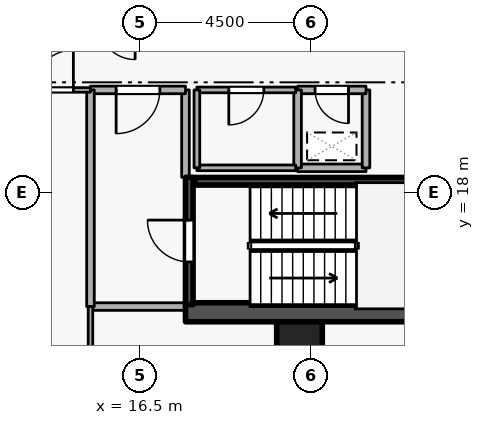
"""IFC4 building model, lengths in metres.
Left out: names, types, materials, properties, quantities, classifications, styles, units other than length and angle.
Written with IfcOpenShell. Run it as: python <this file> out.ifc"""

import sys

from ifc_helpers import new_model, si_unit, direction, frame, frame_2d, origin, origin_2d, place, context, subcontext, project, spatial, rectangle, extrude, element, fill, save


model = new_model("IFC4")
c1 = context("Model", 3, precision=1e-05, world=origin(), true_north=direction((0.0, 1.0)))
c2 = subcontext(c1, "Body", "Model", "MODEL_VIEW")
j1 = project(units=[si_unit("LENGTHUNIT", "METRE"), si_unit("PLANEANGLEUNIT", "RADIAN")], contexts=[c1])
p1 = place(None, origin())
s1 = spatial("IfcSite", under=j1, at=p1, CompositionType="ELEMENT")
p2 = place(p1, origin())
s2 = spatial("IfcBuilding", under=s1, at=p2, CompositionType="ELEMENT")
p3 = place(p2, frame((0.0, 0.0, 137.7)))
s3 = spatial("IfcBuildingStorey", under=s2, at=p3, CompositionType="ELEMENT", Elevation=137.7)
p4 = place(p3, frame((17.7, 14.85, 0.0), z_axis=(0.0, 0.0, 1.0), x_axis=(1.0, 0.0, 0.0)))
e1 = element("IfcWall", 1, at=p4, inside=s3, PredefinedType="SHEAR", context=c2, shape_type="SweptSolid", body=[
    extrude(rectangle(XDim=15.6, YDim=0.5, at=frame_2d((7.8, 0.0))), origin(), (0.0, 0.0, 1.0), 3.6),
])
p5 = place(p3, frame((20.7, 14.0, 0.0), z_axis=(0.0, 0.0, 1.0), x_axis=(1.0, 0.0, 0.0)))
e2 = element("IfcColumn", 2, at=p5, inside=s3, PredefinedType="COLUMN", context=c2, shape_type="SweptSolid", body=[
    extrude(rectangle(XDim=1.2, YDim=1.2, at=origin_2d()), origin(), (0.0, 0.0, 1.0), 3.6),
])
p6 = place(p3, frame((17.8, 15.05, 0.0), z_axis=(0.0, 0.0, 1.0), x_axis=(0.0, 1.0, 0.0)))
e3 = element("IfcWall", 3, at=p6, inside=s3, PredefinedType="SHEAR", context=c2, shape_type="SweptSolid", body=[
    extrude(rectangle(XDim=3.35, YDim=0.2, at=frame_2d((1.675, 0.0))), origin(), (0.0, 0.0, 1.0), 3.6),
])
p7 = place(p6, frame((1.125, 0.0, 0.0)))
e4 = element("IfcOpeningElement", 4, at=p7, cuts=e3, PredefinedType="OPENING", context=c2, shape_type="SweptSolid", body=[
    extrude(rectangle(XDim=1.1, YDim=2.1, at=frame_2d((0.55, 1.05))), frame((0.0, 0.11, 0.0), z_axis=(0.0, -1.0, 0.0), x_axis=(1.0, 0.0, 0.0)), (0.0, 0.0, 1.0), 0.22),
])
p8 = place(p3, frame((25.05, 18.297, 0.0), z_axis=(0.0, 0.0, 1.0), x_axis=(-1.0, 0.0, 0.0)))
e5 = element("IfcWall", 5, at=p8, inside=s3, PredefinedType="SHEAR", context=c2, shape_type="SweptSolid", body=[
    extrude(rectangle(XDim=7.1, YDim=0.2, at=frame_2d((3.55, 0.0))), origin(), (0.0, 0.0, 1.0), 3.6),
])
p9 = place(p3, frame((15.2, 15.0, 0.0), z_axis=(0.0, 0.0, 1.0), x_axis=(1.0, 0.0, 0.0)))
e6 = element("IfcWall", 6, at=p9, inside=s3, PredefinedType="STANDARD", context=c2, shape_type="SweptSolid", body=[
    extrude(rectangle(XDim=2.5, YDim=0.2, at=frame_2d((1.25, 0.0))), origin(), (0.0, 0.0, 1.0), 3.26),
])
p10 = place(p3, frame((17.7, 18.4, 0.0), z_axis=(0.0, 0.0, 1.0), x_axis=(0.0, 1.0, 0.0)))
e7 = element("IfcWall", 7, at=p10, inside=s3, PredefinedType="STANDARD", context=c2, shape_type="SweptSolid", body=[
    extrude(rectangle(XDim=2.3, YDim=0.2, at=frame_2d((1.15, 0.0))), origin(), (0.0, 0.0, 1.0), 2.465),
])
p11 = place(p3, frame((17.7, 20.7, 0.0), z_axis=(0.0, 0.0, 1.0), x_axis=(-1.0, 0.0, 0.0)))
e8 = element("IfcWall", 8, at=p11, inside=s3, PredefinedType="STANDARD", context=c2, shape_type="SweptSolid", body=[
    extrude(rectangle(XDim=2.5, YDim=0.2, at=frame_2d((1.25, 0.0))), origin(), (0.0, 0.0, 1.0), 3.26),
])
p12 = place(p11, frame((0.675, 0.0, 0.0)))
e9 = element("IfcOpeningElement", 9, at=p12, cuts=e8, PredefinedType="OPENING", context=c2, shape_type="SweptSolid", body=[
    extrude(rectangle(XDim=1.15, YDim=2.1, at=frame_2d((0.575, 1.05))), frame((0.0, 0.11, 0.0), z_axis=(0.0, -1.0, 0.0), x_axis=(1.0, 0.0, 0.0)), (0.0, 0.0, 1.0), 0.22),
])
p13 = place(p3, frame((15.2, 20.7, 0.0), z_axis=(0.0, 0.0, 1.0), x_axis=(0.0, -1.0, 0.0)))
e10 = element("IfcWall", 10, at=p13, inside=s3, PredefinedType="STANDARD", context=c2, shape_type="SweptSolid", body=[
    extrude(rectangle(XDim=5.7, YDim=0.2, at=frame_2d((2.85, 0.0))), origin(), (0.0, 0.0, 1.0), 3.26),
])
p14 = place(p3, frame((20.65, 18.65, 0.0), z_axis=(0.0, 0.0, 1.0), x_axis=(1.0, 0.0, 0.0)))
e11 = element("IfcWall", 11, at=p14, inside=s3, PredefinedType="STANDARD", context=c2, shape_type="SweptSolid", body=[
    extrude(rectangle(XDim=1.8, YDim=0.2, at=frame_2d((0.9, 0.0))), origin(), (0.0, 0.0, 1.0), 3.26),
])
p15 = place(p3, frame((22.45, 18.65, 0.0), z_axis=(0.0, 0.0, 1.0), x_axis=(0.0, 1.0, 0.0)))
e12 = element("IfcWall", 12, at=p15, inside=s3, PredefinedType="STANDARD", context=c2, shape_type="SweptSolid", body=[
    extrude(rectangle(XDim=2.05, YDim=0.2, at=frame_2d((1.025, 0.0))), origin(), (0.0, 0.0, 1.0), 3.26),
])
p16 = place(p3, frame((22.45, 20.7, 0.0), z_axis=(0.0, 0.0, 1.0), x_axis=(-1.0, 0.0, 0.0)))
e13 = element("IfcWall", 13, at=p16, inside=s3, PredefinedType="STANDARD", context=c2, shape_type="SweptSolid", body=[
    extrude(rectangle(XDim=1.8, YDim=0.2, at=frame_2d((0.9, 0.0))), origin(), (0.0, 0.0, 1.0), 3.26),
])
p17 = place(p16, frame((0.46, 0.0, 0.0)))
e14 = element("IfcOpeningElement", 14, at=p17, cuts=e13, PredefinedType="OPENING", context=c2, shape_type="SweptSolid", body=[
    extrude(rectangle(XDim=0.88, YDim=2.04, at=frame_2d((0.44, 1.02))), frame((0.0, 0.11, 0.0), z_axis=(0.0, -1.0, 0.0), x_axis=(1.0, 0.0, 0.0)), (0.0, 0.0, 1.0), 0.22),
])
p18 = place(p3, frame((20.65, 20.7, 0.0), z_axis=(0.0, 0.0, 1.0), x_axis=(0.0, -1.0, 0.0)))
e15 = element("IfcWall", 15, at=p18, inside=s3, PredefinedType="STANDARD", context=c2, shape_type="SweptSolid", body=[
    extrude(rectangle(XDim=2.05, YDim=0.2, at=frame_2d((1.025, 0.0))), origin(), (0.0, 0.0, 1.0), 3.26),
])
p19 = place(p3, frame((18.0, 18.65, 0.0), z_axis=(0.0, 0.0, 1.0), x_axis=(1.0, 0.0, 0.0)))
e16 = element("IfcWall", 16, at=p19, inside=s3, PredefinedType="PARTITIONING", context=c2, shape_type="SweptSolid", body=[
    extrude(rectangle(XDim=2.6, YDim=0.15, at=frame_2d((1.3, 0.0))), origin(), (0.0, 0.0, 1.0), 3.26),
])
p20 = place(p3, frame((20.6, 20.7, 0.0), z_axis=(0.0, 0.0, 1.0), x_axis=(-1.0, 0.0, 0.0)))
e17 = element("IfcWall", 17, at=p20, inside=s3, PredefinedType="PARTITIONING", context=c2, shape_type="SweptSolid", body=[
    extrude(rectangle(XDim=2.6, YDim=0.15, at=frame_2d((1.3, 0.0))), origin(), (0.0, 0.0, 1.0), 3.26),
])
p21 = place(p20, frame((0.84, 0.0, 0.0)))
e18 = element("IfcOpeningElement", 18, at=p21, cuts=e17, PredefinedType="OPENING", context=c2, shape_type="SweptSolid", body=[
    extrude(rectangle(XDim=0.92, YDim=2.08, at=frame_2d((0.46, 1.04))), frame((0.0, 0.085, 0.0), z_axis=(0.0, -1.0, 0.0), x_axis=(1.0, 0.0, 0.0)), (0.0, 0.0, 1.0), 0.17),
])
p22 = place(p3, frame((18.0, 20.7, 0.0), z_axis=(0.0, 0.0, 1.0), x_axis=(0.0, -1.0, 0.0)))
e19 = element("IfcWall", 19, at=p22, inside=s3, PredefinedType="PARTITIONING", context=c2, shape_type="SweptSolid", body=[
    extrude(rectangle(XDim=2.05, YDim=0.15, at=frame_2d((1.025, 0.0))), origin(), (0.0, 0.0, 1.0), 2.465),
])
p23 = place(p3, frame((13.25, 20.7, 0.0), z_axis=(0.0, 0.0, 1.0), x_axis=(1.0, 0.0, 0.0)))
e20 = element("IfcWall", 20, at=p23, inside=s3, PredefinedType="PARTITIONING", context=c2, shape_type="SweptSolid", body=[
    extrude(rectangle(XDim=1.95, YDim=0.12, at=frame_2d((0.975, 0.0))), origin(), (0.0, 0.0, 1.0), 3.26),
])
p24 = place(p23, frame((0.45, 0.0, 0.0)))
e21 = element("IfcOpeningElement", 21, at=p24, cuts=e20, PredefinedType="OPENING", context=c2, shape_type="SweptSolid", body=[
    extrude(rectangle(XDim=1.05, YDim=2.1, at=frame_2d((0.525, 1.05))), frame((0.0, 0.07, 0.0), z_axis=(0.0, -1.0, 0.0), x_axis=(1.0, 0.0, 0.0)), (0.0, 0.0, 1.0), 0.14),
])
p25 = place(p3, frame((15.2, 15.0, 0.0), z_axis=(0.0, 0.0, 1.0), x_axis=(0.0, -1.0, 0.0)))
e22 = element("IfcWall", 22, at=p25, inside=s3, PredefinedType="PARTITIONING", context=c2, shape_type="SweptSolid", body=[
    extrude(rectangle(XDim=11.72, YDim=0.12, at=frame_2d((5.86, 0.0))), origin(), (0.0, 0.0, 1.0), 3.26),
])
p26 = place(p7, origin())
e23 = element("IfcDoor", 23, at=p26, inside=s3, OperationType="SINGLE_SWING_RIGHT", PredefinedType="DOOR", context=c2, shape_type="SweptSolid", body=[
    extrude(rectangle(XDim=1.1, YDim=2.1, at=frame_2d((0.55, 1.05))), frame((0.0, 0.025, 0.0), z_axis=(0.0, -1.0, 0.0), x_axis=(1.0, 0.0, 0.0)), (0.0, 0.0, 1.0), 0.05),
])
fill(e4, e23)
p27 = place(p12, origin())
e24 = element("IfcDoor", 24, at=p27, inside=s3, OperationType="SINGLE_SWING_RIGHT", PredefinedType="DOOR", context=c2, shape_type="SweptSolid", body=[
    extrude(rectangle(XDim=1.15, YDim=2.1, at=frame_2d((0.575, 1.05))), frame((0.0, 0.025, 0.0), z_axis=(0.0, -1.0, 0.0), x_axis=(1.0, 0.0, 0.0)), (0.0, 0.0, 1.0), 0.05),
])
fill(e9, e24)
p28 = place(p17, origin())
e25 = element("IfcDoor", 25, at=p28, inside=s3, OperationType="SINGLE_SWING_LEFT", PredefinedType="DOOR", context=c2, shape_type="SweptSolid", body=[
    extrude(rectangle(XDim=0.88, YDim=2.04, at=frame_2d((0.44, 1.02))), frame((0.0, 0.025, 0.0), z_axis=(0.0, -1.0, 0.0), x_axis=(1.0, 0.0, 0.0)), (0.0, 0.0, 1.0), 0.05),
])
fill(e14, e25)
p29 = place(p21, origin())
e26 = element("IfcDoor", 26, at=p29, inside=s3, OperationType="SINGLE_SWING_RIGHT", PredefinedType="DOOR", context=c2, shape_type="SweptSolid", body=[
    extrude(rectangle(XDim=0.92, YDim=2.08, at=frame_2d((0.46, 1.04))), frame((0.0, 0.025, 0.0), z_axis=(0.0, -1.0, 0.0), x_axis=(1.0, 0.0, 0.0)), (0.0, 0.0, 1.0), 0.05),
])
fill(e18, e26)
p30 = place(p24, origin())
e27 = element("IfcDoor", 27, at=p30, inside=s3, OperationType="SINGLE_SWING_RIGHT", PredefinedType="DOOR", context=c2, shape_type="SweptSolid", body=[
    extrude(rectangle(XDim=1.05, YDim=2.1, at=frame_2d((0.525, 1.05))), frame((0.0, 0.025, 0.0), z_axis=(0.0, -1.0, 0.0), x_axis=(1.0, 0.0, 0.0)), (0.0, 0.0, 1.0), 0.05),
])
fill(e21, e27)
save(model, sys.argv[1])
